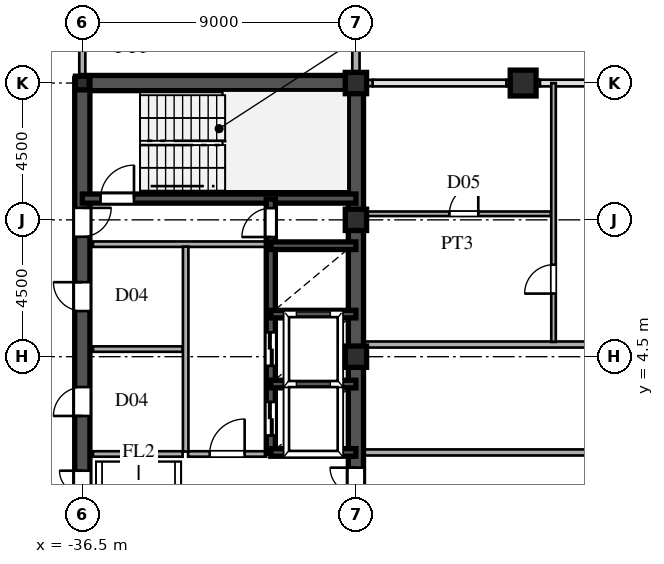
"""IFC4 building model, lengths in metres.
Left out: names, types, materials, properties, quantities, classifications, styles, units other than length and angle.
Written with IfcOpenShell. Run it as: python <this file> out.ifc"""

import sys

from ifc_helpers import new_model, si_unit, direction, frame, frame_2d, origin, origin_2d, place, context, subcontext, project, spatial, rectangle, hollow_rectangle, i_section, extrude, source, transform, mapped, element, fill, save


model = new_model("IFC4")
c1 = context("Model", 3, precision=1e-05, world=origin(), true_north=direction((0.0, 1.0)))
c2 = subcontext(c1, "Body", "Model", "MODEL_VIEW")
j1 = project(units=[si_unit("LENGTHUNIT", "METRE"), si_unit("PLANEANGLEUNIT", "RADIAN")], contexts=[c1])
p1 = place(None, origin())
s1 = spatial("IfcSite", under=j1, at=p1, CompositionType="ELEMENT")
p2 = place(p1, origin())
s2 = spatial("IfcBuilding", under=s1, at=p2, CompositionType="ELEMENT")
p3 = place(p2, frame((0.0, 0.0, 258.15)))
s3 = spatial("IfcBuildingStorey", under=s2, at=p3, CompositionType="ELEMENT", Elevation=258.15)
m1 = source(origin(), c2, "Body", "SweptSolid", [
    extrude(hollow_rectangle(XDim=0.7, YDim=0.7, WallThickness=0.03, at=origin_2d()), origin(), (0.0, 0.0, 1.0), 3.75),
])
for number, where, z_axis, x_axis in (
    (1, (-27.5, 4.5, 0.0), (0.0, 0.0, 1.0), (1.0, 0.0, 0.0)),
    (2, (-27.5, 9.0, 0.0), (0.0, 0.0, 1.0), (1.0, 0.0, 0.0)),
    (3, (-27.5, 13.5, 0.0), (0.0, 0.0, 1.0), (1.0, 0.0, 0.0)),
):
    element("IfcColumn", number, at=place(p3, frame(where, z_axis=z_axis, x_axis=x_axis)), inside=s3, PredefinedType="COLUMN", context=c2, shape_type="MappedRepresentation", body=[
        mapped(m1, transform((0.0, 0.0, 0.0), scale=1.0)),
    ])
m2 = source(origin(), c2, "Body", "SweptSolid", [
    extrude(i_section(OverallWidth=0.45, OverallDepth=0.45, WebThickness=0.016, FlangeThickness=0.025, at=origin_2d()), origin(), (0.0, 0.0, 1.0), 3.75),
])
p4 = place(p3, frame((-36.5, 13.5, 0.0), z_axis=(0.0, 0.0, 1.0), x_axis=(1.0, 0.0, 0.0)))
e4 = element("IfcColumn", 4, at=p4, inside=s3, PredefinedType="COLUMN", context=c2, shape_type="MappedRepresentation", body=[
    mapped(m2, transform((0.0, 0.0, 0.0), scale=1.0)),
])
m3 = source(origin(), c2, "Body", "SweptSolid", [
    extrude(hollow_rectangle(XDim=0.85, YDim=0.85, WallThickness=0.036, at=origin_2d()), origin(), (0.0, 0.0, 1.0), 3.75),
])
p5 = place(p3, frame((-22.0, 13.5, 0.0), z_axis=(0.0, 0.0, 1.0), x_axis=(1.0, 0.0, 0.0)))
e5 = element("IfcColumn", 5, at=p5, inside=s3, PredefinedType="COLUMN", context=c2, shape_type="MappedRepresentation", body=[
    mapped(m3, transform((0.0, 0.0, 0.0), scale=1.0)),
])
p6 = place(p3, frame((-27.5, 13.755, 0.0), z_axis=(0.0, 0.0, 1.0), x_axis=(0.0, 1.0, 0.0)))
e6 = element("IfcWall", 6, at=p6, inside=s3, PredefinedType="SOLIDWALL", context=c2, shape_type="SweptSolid", body=[
    extrude(rectangle(XDim=0.62, YDim=0.24, at=frame_2d((0.31, 0.0))), origin(), (0.0, 0.0, 1.0), 3.03),
])
p7 = place(p3, frame((-27.5, 14.375, 0.0), z_axis=(0.0, 0.0, 1.0), x_axis=(0.0, 1.0, 0.0)))
e7 = element("IfcWall", 7, at=p7, inside=s3, PredefinedType="SOLIDWALL", context=c2, shape_type="SweptSolid", body=[
    extrude(rectangle(XDim=1.605, YDim=0.24, at=frame_2d((0.803, 0.0))), origin(), (0.0, 0.0, 1.0), 3.53),
])
p8 = place(p3, frame((-27.49, 13.5, 0.0), z_axis=(0.0, 0.0, 1.0), x_axis=(1.0, 0.0, 0.0)))
e8 = element("IfcWall", 8, at=p8, inside=s3, PredefinedType="SOLIDWALL", context=c2, shape_type="SweptSolid", body=[
    extrude(rectangle(XDim=0.54, YDim=0.21, at=frame_2d((0.27, 0.0))), origin(), (0.0, 0.0, 1.0), 3.03),
])
p9 = place(p3, frame((-22.55, 13.5, 0.0), z_axis=(0.0, 0.0, 1.0), x_axis=(1.0, 0.0, 0.0)))
e9 = element("IfcWall", 9, at=p9, inside=s3, PredefinedType="SOLIDWALL", context=c2, shape_type="SweptSolid", body=[
    extrude(rectangle(XDim=1.1, YDim=0.21, at=frame_2d((0.55, 0.0))), origin(), (0.0, 0.0, 1.0), 3.03),
])
p10 = place(p3, frame((-27.5, 1.3, 0.0), z_axis=(0.0, 0.0, 1.0), x_axis=(0.0, 1.0, 0.0)))
e10 = element("IfcWall", 10, at=p10, inside=s3, PredefinedType="SHEAR", context=c2, shape_type="SweptSolid", body=[
    extrude(rectangle(XDim=12.2, YDim=0.5, at=frame_2d((6.1, 0.0))), origin(), (0.0, 0.0, 1.0), 3.53),
])
p11 = place(p3, frame((-27.5, -1.3, 0.0), z_axis=(0.0, 0.0, 1.0), x_axis=(0.0, 1.0, 0.0)))
e11 = element("IfcWall", 11, at=p11, inside=s3, PredefinedType="SHEAR", context=c2, shape_type="SweptSolid", body=[
    extrude(rectangle(XDim=2.6, YDim=0.5, at=frame_2d((1.3, 0.0))), origin(), (0.0, 0.0, 1.0), 3.53),
])
p12 = place(p11, frame((0.45, 0.0, 0.0)))
e12 = element("IfcOpeningElement", 12, at=p12, cuts=e11, PredefinedType="OPENING", context=c2, shape_type="SweptSolid", body=[
    extrude(rectangle(XDim=1.7, YDim=2.35, at=frame_2d((0.85, 1.175))), frame((0.0, 0.26, 0.0), z_axis=(0.0, -1.0, 0.0), x_axis=(1.0, 0.0, 0.0)), (0.0, 0.0, 1.0), 0.52),
])
p13 = place(p3, frame((-36.5, 13.5, 0.0), z_axis=(0.0, 0.0, 1.0), x_axis=(1.0, 0.0, 0.0)))
e13 = element("IfcWall", 13, at=p13, inside=s3, PredefinedType="SHEAR", context=c2, shape_type="SweptSolid", body=[
    extrude(rectangle(XDim=9.0, YDim=0.5, at=frame_2d((4.5, 0.0))), origin(), (0.0, 0.0, 1.0), 3.53),
])
p14 = place(p3, frame((-36.5, -1.3, 0.0), z_axis=(0.0, 0.0, 1.0), x_axis=(0.0, 1.0, 0.0)))
e14 = element("IfcWall", 14, at=p14, inside=s3, PredefinedType="SHEAR", context=c2, shape_type="SweptSolid", body=[
    extrude(rectangle(XDim=2.6, YDim=0.5, at=frame_2d((1.3, 0.0))), origin(), (0.0, 0.0, 1.0), 3.53),
])
p15 = place(p14, frame((0.55, 0.0, 0.0)))
e15 = element("IfcOpeningElement", 15, at=p15, cuts=e14, PredefinedType="OPENING", context=c2, shape_type="SweptSolid", body=[
    extrude(rectangle(XDim=1.5, YDim=2.3, at=frame_2d((0.75, 1.15))), frame((0.0, 0.26, 0.0), z_axis=(0.0, -1.0, 0.0), x_axis=(1.0, 0.0, 0.0)), (0.0, 0.0, 1.0), 0.52),
])
p16 = place(p3, frame((-36.5, 8.2, 0.0), z_axis=(0.0, 0.0, 1.0), x_axis=(0.0, 1.0, 0.0)))
e16 = element("IfcWall", 16, at=p16, inside=s3, PredefinedType="SHEAR", context=c2, shape_type="SweptSolid", body=[
    extrude(rectangle(XDim=5.45, YDim=0.5, at=frame_2d((2.725, 0.0))), origin(), (0.0, 0.0, 1.0), 3.53),
])
p17 = place(p16, frame((0.245, 0.0, 0.0)))
e17 = element("IfcOpeningElement", 17, at=p17, cuts=e16, PredefinedType="OPENING", context=c2, shape_type="SweptSolid", body=[
    extrude(rectangle(XDim=0.95, YDim=2.15, at=frame_2d((0.475, 1.075))), frame((0.0, 0.26, 0.0), z_axis=(0.0, -1.0, 0.0), x_axis=(1.0, 0.0, 0.0)), (0.0, 0.0, 1.0), 0.52),
])
p18 = place(p3, frame((-36.5, 1.3, 0.0), z_axis=(0.0, 0.0, 1.0), x_axis=(0.0, 1.0, 0.0)))
e18 = element("IfcWall", 18, at=p18, inside=s3, PredefinedType="SHEAR", context=c2, shape_type="SweptSolid", body=[
    extrude(rectangle(XDim=3.45, YDim=0.5, at=frame_2d((1.725, 0.0))), origin(), (0.0, 0.0, 1.0), 3.53),
])
p19 = place(p18, frame((1.25, 0.0, 0.0)))
e19 = element("IfcOpeningElement", 19, at=p19, cuts=e18, PredefinedType="OPENING", context=c2, shape_type="SweptSolid", body=[
    extrude(rectangle(XDim=0.95, YDim=2.15, at=frame_2d((0.475, 1.075))), frame((0.0, 0.26, 0.0), z_axis=(0.0, -1.0, 0.0), x_axis=(1.0, 0.0, 0.0)), (0.0, 0.0, 1.0), 0.52),
])
p20 = place(p3, frame((-36.5, 4.75, 0.0), z_axis=(0.0, 0.0, 1.0), x_axis=(0.0, 1.0, 0.0)))
e20 = element("IfcWall", 20, at=p20, inside=s3, PredefinedType="SHEAR", context=c2, shape_type="SweptSolid", body=[
    extrude(rectangle(XDim=3.45, YDim=0.5, at=frame_2d((1.725, 0.0))), origin(), (0.0, 0.0, 1.0), 3.53),
])
p21 = place(p20, frame((1.25, 0.0, 0.0)))
e21 = element("IfcOpeningElement", 21, at=p21, cuts=e20, PredefinedType="OPENING", context=c2, shape_type="SweptSolid", body=[
    extrude(rectangle(XDim=0.95, YDim=2.15, at=frame_2d((0.475, 1.075))), frame((0.0, 0.26, 0.0), z_axis=(0.0, -1.0, 0.0), x_axis=(1.0, 0.0, 0.0)), (0.0, 0.0, 1.0), 0.52),
])
p22 = place(p3, frame((-36.5, 9.7, 0.0), z_axis=(0.0, 0.0, 1.0), x_axis=(1.0, 0.0, 0.0)))
e22 = element("IfcWall", 22, at=p22, inside=s3, PredefinedType="SHEAR", context=c2, shape_type="SweptSolid", body=[
    extrude(rectangle(XDim=9.0, YDim=0.3, at=frame_2d((4.5, 0.0))), origin(), (0.0, 0.0, 1.0), 3.53),
])
p23 = place(p22, frame((0.6, 0.0, 0.0)))
e23 = element("IfcOpeningElement", 23, at=p23, cuts=e22, PredefinedType="OPENING", context=c2, shape_type="SweptSolid", body=[
    extrude(rectangle(XDim=1.1, YDim=2.2, at=frame_2d((0.55, 1.1))), frame((0.0, 0.16, 0.0), z_axis=(0.0, -1.0, 0.0), x_axis=(1.0, 0.0, 0.0)), (0.0, 0.0, 1.0), 0.32),
])
for number, where, z_axis, x_axis in (
    (24, (-30.3, 1.35, 0.0), (0.0, 0.0, 1.0), (1.0, 0.0, 0.0)),
    (25, (-30.3, 3.6, 0.0), (0.0, 0.0, 1.0), (1.0, 0.0, 0.0)),
    (26, (-30.3, 5.9, 0.0), (0.0, 0.0, 1.0), (1.0, 0.0, 0.0)),
    (27, (-30.3, 8.15, 0.0), (0.0, 0.0, 1.0), (1.0, 0.0, 0.0)),
):
    element("IfcWall", number, at=place(p3, frame(where, z_axis=z_axis, x_axis=x_axis)), inside=s3, PredefinedType="SHEAR", context=c2, shape_type="SweptSolid", body=[
        extrude(rectangle(XDim=2.8, YDim=0.25, at=frame_2d((1.4, 0.0))), origin(), (0.0, 0.0, 1.0), 3.53),
    ])
p24 = place(p3, frame((-30.3, 1.32, 0.0), z_axis=(0.0, 0.0, 1.0), x_axis=(0.0, 1.0, 0.0)))
e28 = element("IfcWall", 28, at=p24, inside=s3, PredefinedType="SHEAR", context=c2, shape_type="SweptSolid", body=[
    extrude(rectangle(XDim=2.28, YDim=0.3, at=frame_2d((1.14, 0.0))), origin(), (0.0, 0.0, 1.0), 3.53),
])
p25 = place(p24, frame((0.59, 0.0, 0.0)))
e29 = element("IfcOpeningElement", 29, at=p25, cuts=e28, PredefinedType="OPENING", context=c2, shape_type="SweptSolid", body=[
    extrude(rectangle(XDim=1.1, YDim=2.2, at=frame_2d((0.55, 1.1))), frame((0.0, 0.16, 0.0), z_axis=(0.0, -1.0, 0.0), x_axis=(1.0, 0.0, 0.0)), (0.0, 0.0, 1.0), 0.32),
])
p26 = place(p3, frame((-30.3, 3.6, 0.0), z_axis=(0.0, 0.0, 1.0), x_axis=(0.0, 1.0, 0.0)))
e30 = element("IfcWall", 30, at=p26, inside=s3, PredefinedType="SHEAR", context=c2, shape_type="SweptSolid", body=[
    extrude(rectangle(XDim=2.3, YDim=0.3, at=frame_2d((1.15, 0.0))), origin(), (0.0, 0.0, 1.0), 3.53),
])
p27 = place(p26, frame((0.6, 0.0, 0.0)))
e31 = element("IfcOpeningElement", 31, at=p27, cuts=e30, PredefinedType="OPENING", context=c2, shape_type="SweptSolid", body=[
    extrude(rectangle(XDim=1.1, YDim=2.2, at=frame_2d((0.55, 1.1))), frame((0.0, 0.16, 0.0), z_axis=(0.0, -1.0, 0.0), x_axis=(1.0, 0.0, 0.0)), (0.0, 0.0, 1.0), 0.32),
])
p28 = place(p3, frame((-30.3, 5.9, 0.0), z_axis=(0.0, 0.0, 1.0), x_axis=(0.0, 1.0, 0.0)))
e32 = element("IfcWall", 32, at=p28, inside=s3, PredefinedType="SHEAR", context=c2, shape_type="SweptSolid", body=[
    extrude(rectangle(XDim=2.25, YDim=0.3, at=frame_2d((1.125, 0.0))), origin(), (0.0, 0.0, 1.0), 3.53),
])
p29 = place(p3, frame((-30.3, 8.15, 0.0), z_axis=(0.0, 0.0, 1.0), x_axis=(0.0, 1.0, 0.0)))
e33 = element("IfcWall", 33, at=p29, inside=s3, PredefinedType="SHEAR", context=c2, shape_type="SweptSolid", body=[
    extrude(rectangle(XDim=1.53, YDim=0.3, at=frame_2d((0.765, 0.0))), origin(), (0.0, 0.0, 1.0), 3.53),
])
p30 = place(p29, frame((0.285, 0.0, 0.0)))
e34 = element("IfcOpeningElement", 34, at=p30, cuts=e33, PredefinedType="OPENING", context=c2, shape_type="SweptSolid", body=[
    extrude(rectangle(XDim=0.95, YDim=2.15, at=frame_2d((0.475, 1.075))), frame((0.0, 0.16, 0.0), z_axis=(0.0, -1.0, 0.0), x_axis=(1.0, 0.0, 0.0)), (0.0, 0.0, 1.0), 0.32),
])
p31 = place(p3, frame((-36.15, 8.2, 0.0), z_axis=(0.0, 0.0, 1.0), x_axis=(1.0, 0.0, 0.0)))
e35 = element("IfcWall", 35, at=p31, inside=s3, PredefinedType="PARTITIONING", context=c2, shape_type="SweptSolid", body=[
    extrude(rectangle(XDim=5.7, YDim=0.18, at=frame_2d((2.85, 0.0))), origin(), (0.0, 0.0, 1.0), 3.53),
])
p32 = place(p3, frame((-33.1, 1.38, 0.0), z_axis=(0.0, 0.0, 1.0), x_axis=(0.0, 1.0, 0.0)))
e36 = element("IfcWall", 36, at=p32, inside=s3, PredefinedType="PARTITIONING", context=c2, shape_type="SweptSolid", body=[
    extrude(rectangle(XDim=6.74, YDim=0.18, at=frame_2d((3.37, 0.0))), origin(), (0.0, 0.0, 1.0), 3.53),
])
p33 = place(p3, frame((-33.02, 1.3, 0.0), z_axis=(0.0, 0.0, 1.0), x_axis=(1.0, 0.0, 0.0)))
e37 = element("IfcWall", 37, at=p33, inside=s3, PredefinedType="PARTITIONING", context=c2, shape_type="SweptSolid", body=[
    extrude(rectangle(XDim=2.57, YDim=0.18, at=frame_2d((1.285, 0.0))), origin(), (0.0, 0.0, 1.0), 3.53),
])
p34 = place(p33, frame((0.71, 0.0, 0.0)))
e38 = element("IfcOpeningElement", 38, at=p34, cuts=e37, PredefinedType="OPENING", context=c2, shape_type="SweptSolid", body=[
    extrude(rectangle(XDim=1.15, YDim=2.2, at=frame_2d((0.575, 1.1))), frame((0.0, 0.1, 0.0), z_axis=(0.0, -1.0, 0.0), x_axis=(1.0, 0.0, 0.0)), (0.0, 0.0, 1.0), 0.2),
])
for number, where, z_axis, x_axis in (
    (39, (-36.15, 1.3, 0.0), (0.0, 0.0, 1.0), (1.0, 0.0, 0.0)),
    (40, (-36.15, 4.75, 0.0), (0.0, 0.0, 1.0), (1.0, 0.0, 0.0)),
):
    element("IfcWall", number, at=place(p3, frame(where, z_axis=z_axis, x_axis=x_axis)), inside=s3, PredefinedType="PARTITIONING", context=c2, shape_type="SweptSolid", body=[
        extrude(rectangle(XDim=2.95, YDim=0.18, at=frame_2d((1.475, 0.0))), origin(), (0.0, 0.0, 1.0), 3.53),
    ])
p35 = place(p3, frame((-27.245, 1.35, 0.0), z_axis=(0.0, 0.0, 1.0), x_axis=(1.0, 0.0, 0.0)))
e41 = element("IfcWall", 41, at=p35, inside=s3, PredefinedType="PARTITIONING", context=c2, shape_type="SweptSolid", body=[
    extrude(rectangle(XDim=19.66, YDim=0.2, at=frame_2d((9.83, 0.0))), origin(), (0.0, 0.0, 1.0), 3.53),
])
p36 = place(p35, frame((12.97, 0.0, 0.0)))
e42 = element("IfcOpeningElement", 42, at=p36, cuts=e41, PredefinedType="OPENING", context=c2, shape_type="SweptSolid", body=[
    extrude(rectangle(XDim=1.05, YDim=2.25, at=frame_2d((0.525, 1.125))), frame((0.0, 0.11, 0.0), z_axis=(0.0, -1.0, 0.0), x_axis=(1.0, 0.0, 0.0)), (0.0, 0.0, 1.0), 0.22),
])
p37 = place(p3, frame((-27.245, 4.9, 0.0), z_axis=(0.0, 0.0, 1.0), x_axis=(1.0, 0.0, 0.0)))
e43 = element("IfcWall", 43, at=p37, inside=s3, PredefinedType="PARTITIONING", context=c2, shape_type="SweptSolid", body=[
    extrude(rectangle(XDim=54.49, YDim=0.2, at=frame_2d((27.245, 0.0))), origin(), (0.0, 0.0, 1.0), 3.53),
])
p38 = place(p37, frame((22.47, 0.0, 0.0)))
e44 = element("IfcOpeningElement", 44, at=p38, cuts=e43, PredefinedType="OPENING", context=c2, shape_type="SweptSolid", body=[
    extrude(rectangle(XDim=1.05, YDim=2.25, at=frame_2d((0.525, 1.125))), frame((0.0, 0.11, 0.0), z_axis=(0.0, -1.0, 0.0), x_axis=(1.0, 0.0, 0.0)), (0.0, 0.0, 1.0), 0.22),
])
p39 = place(p3, frame((-27.245, 9.2, 0.0), z_axis=(0.0, 0.0, 1.0), x_axis=(1.0, 0.0, 0.0)))
e45 = element("IfcWall", 45, at=p39, inside=s3, PredefinedType="PARTITIONING", context=c2, shape_type="SweptSolid", body=[
    extrude(rectangle(XDim=6.16, YDim=0.15, at=frame_2d((3.08, 0.0))), origin(), (0.0, 0.0, 1.0), 3.53),
])
p40 = place(p39, frame((2.82, 0.0, 0.0)))
e46 = element("IfcOpeningElement", 46, at=p40, cuts=e45, PredefinedType="OPENING", context=c2, shape_type="SweptSolid", body=[
    extrude(rectangle(XDim=0.95, YDim=2.15, at=frame_2d((0.475, 1.075))), frame((0.0, 0.085, 0.0), z_axis=(0.0, -1.0, 0.0), x_axis=(1.0, 0.0, 0.0)), (0.0, 0.0, 1.0), 0.17),
])
p41 = place(p3, frame((-36.5, 13.755, 0.0), z_axis=(0.0, 0.0, 1.0), x_axis=(0.0, 1.0, 0.0)))
e47 = element("IfcWall", 47, at=p41, inside=s3, PredefinedType="PARTITIONING", context=c2, shape_type="SweptSolid", body=[
    extrude(rectangle(XDim=1.76, YDim=0.2, at=frame_2d((0.88, 0.0))), origin(), (0.0, 0.0, 1.0), 2.93),
])
p42 = place(p3, frame((-21.0, 4.985, 0.0), z_axis=(0.0, 0.0, 1.0), x_axis=(0.0, 1.0, 0.0)))
e48 = element("IfcWall", 48, at=p42, inside=s3, PredefinedType="PARTITIONING", context=c2, shape_type="SweptSolid", body=[
    extrude(rectangle(XDim=8.515, YDim=0.15, at=frame_2d((4.257, 0.0))), origin(), (0.0, 0.0, 1.0), 3.53),
])
p43 = place(p42, frame((1.59, 0.0, 0.0)))
e49 = element("IfcOpeningElement", 49, at=p43, cuts=e48, PredefinedType="OPENING", context=c2, shape_type="SweptSolid", body=[
    extrude(rectangle(XDim=0.95, YDim=2.15, at=frame_2d((0.475, 1.075))), frame((0.0, 0.085, 0.0), z_axis=(0.0, -1.0, 0.0), x_axis=(1.0, 0.0, 0.0)), (0.0, 0.0, 1.0), 0.17),
])
m4 = source(origin(), c2, "Body", "SweptSolid", [
    extrude(rectangle(XDim=1.7, YDim=2.35, at=frame_2d((0.85, 1.175))), frame((0.0, 0.025, 0.0), z_axis=(0.0, -1.0, 0.0), x_axis=(1.0, 0.0, 0.0)), (0.0, 0.0, 1.0), 0.05),
])
p44 = place(p12, origin())
e50 = element("IfcDoor", 50, at=p44, inside=s3, OperationType="DOUBLE_SWING_LEFT", PredefinedType="DOOR", context=c2, shape_type="MappedRepresentation", body=[
    mapped(m4, transform((0.0, 0.0, 0.0), scale=1.0)),
])
fill(e12, e50)
m5 = source(origin(), c2, "Body", "SweptSolid", [
    extrude(rectangle(XDim=1.5, YDim=2.3, at=frame_2d((0.75, 1.15))), frame((0.0, 0.025, 0.0), z_axis=(0.0, -1.0, 0.0), x_axis=(1.0, 0.0, 0.0)), (0.0, 0.0, 1.0), 0.05),
])
p45 = place(p15, origin())
e51 = element("IfcDoor", 51, at=p45, inside=s3, OperationType="DOUBLE_SWING_LEFT", PredefinedType="DOOR", context=c2, shape_type="MappedRepresentation", body=[
    mapped(m5, transform((0.0, 0.0, 0.0), scale=1.0)),
])
fill(e15, e51)
m6 = source(origin(), c2, "Body", "SweptSolid", [
    extrude(rectangle(XDim=0.95, YDim=2.15, at=frame_2d((0.475, 1.075))), frame((0.0, 0.025, 0.0), z_axis=(0.0, -1.0, 0.0), x_axis=(1.0, 0.0, 0.0)), (0.0, 0.0, 1.0), 0.05),
])
p46 = place(p17, frame((0.95, 0.0, 0.0), z_axis=(0.0, 0.0, 1.0), x_axis=(-1.0, 0.0, 0.0)))
e52 = element("IfcDoor", 52, at=p46, inside=s3, OperationType="SINGLE_SWING_RIGHT", PredefinedType="DOOR", context=c2, shape_type="MappedRepresentation", body=[
    mapped(m6, transform((0.0, 0.0, 0.0), scale=1.0)),
])
fill(e17, e52)
p47 = place(p19, origin())
e53 = element("IfcDoor", 53, at=p47, inside=s3, OperationType="SINGLE_SWING_LEFT", PredefinedType="DOOR", context=c2, shape_type="MappedRepresentation", body=[
    mapped(m6, transform((0.0, 0.0, 0.0), scale=1.0)),
])
fill(e19, e53)
p48 = place(p21, origin())
e54 = element("IfcDoor", 54, at=p48, inside=s3, OperationType="SINGLE_SWING_RIGHT", PredefinedType="DOOR", context=c2, shape_type="MappedRepresentation", body=[
    mapped(m6, transform((0.0, 0.0, 0.0), scale=1.0)),
])
fill(e21, e54)
m7 = source(origin(), c2, "Body", "SweptSolid", [
    extrude(rectangle(XDim=1.1, YDim=2.2, at=frame_2d((0.55, 1.1))), frame((0.0, 0.025, 0.0), z_axis=(0.0, -1.0, 0.0), x_axis=(1.0, 0.0, 0.0)), (0.0, 0.0, 1.0), 0.05),
])
p49 = place(p23, origin())
e55 = element("IfcDoor", 55, at=p49, inside=s3, OperationType="SINGLE_SWING_RIGHT", PredefinedType="DOOR", context=c2, shape_type="MappedRepresentation", body=[
    mapped(m7, transform((0.0, 0.0, 0.0), scale=1.0)),
])
fill(e23, e55)
m8 = source(origin(), c2, "Body", "SweptSolid", [
    extrude(rectangle(XDim=1.1, YDim=2.2, at=frame_2d((0.55, 1.1))), frame((0.0, 0.025, 0.0), z_axis=(0.0, -1.0, 0.0), x_axis=(1.0, 0.0, 0.0)), (0.0, 0.0, 1.0), 0.05),
])
p50 = place(p25, origin())
e56 = element("IfcDoor", 56, at=p50, inside=s3, OperationType="DOUBLE_DOOR_SLIDING", PredefinedType="DOOR", context=c2, shape_type="MappedRepresentation", body=[
    mapped(m8, transform((0.0, 0.0, 0.0), scale=1.0)),
])
fill(e29, e56)
p51 = place(p27, origin())
e57 = element("IfcDoor", 57, at=p51, inside=s3, OperationType="DOUBLE_DOOR_SLIDING", PredefinedType="DOOR", context=c2, shape_type="MappedRepresentation", body=[
    mapped(m8, transform((0.0, 0.0, 0.0), scale=1.0)),
])
fill(e31, e57)
p52 = place(p30, origin())
e58 = element("IfcDoor", 58, at=p52, inside=s3, OperationType="SINGLE_SWING_LEFT", PredefinedType="DOOR", context=c2, shape_type="MappedRepresentation", body=[
    mapped(m6, transform((0.0, 0.0, 0.0), scale=1.0)),
])
fill(e34, e58)
m9 = source(origin(), c2, "Body", "SweptSolid", [
    extrude(rectangle(XDim=1.15, YDim=2.2, at=frame_2d((0.575, 1.1))), frame((0.0, 0.025, 0.0), z_axis=(0.0, -1.0, 0.0), x_axis=(1.0, 0.0, 0.0)), (0.0, 0.0, 1.0), 0.05),
])
p53 = place(p34, origin())
e59 = element("IfcDoor", 59, at=p53, inside=s3, OperationType="SINGLE_SWING_RIGHT", PredefinedType="DOOR", context=c2, shape_type="MappedRepresentation", body=[
    mapped(m9, transform((0.0, 0.0, 0.0), scale=1.0)),
])
fill(e38, e59)
m10 = source(origin(), c2, "Body", "SweptSolid", [
    extrude(rectangle(XDim=0.95, YDim=2.15, at=frame_2d((0.475, 1.075))), frame((0.0, 0.025, 0.0), z_axis=(0.0, -1.0, 0.0), x_axis=(1.0, 0.0, 0.0)), (0.0, 0.0, 1.0), 0.05),
])
p54 = place(p40, origin())
e60 = element("IfcDoor", 60, at=p54, inside=s3, OperationType="SINGLE_SWING_RIGHT", PredefinedType="DOOR", context=c2, shape_type="MappedRepresentation", body=[
    mapped(m10, transform((0.0, 0.0, 0.0), scale=1.0)),
])
fill(e46, e60)
p55 = place(p43, origin())
e61 = element("IfcDoor", 61, at=p55, inside=s3, OperationType="SINGLE_SWING_LEFT", PredefinedType="DOOR", context=c2, shape_type="MappedRepresentation", body=[
    mapped(m10, transform((0.0, 0.0, 0.0), scale=1.0)),
])
fill(e49, e61)
save(model, sys.argv[1])
